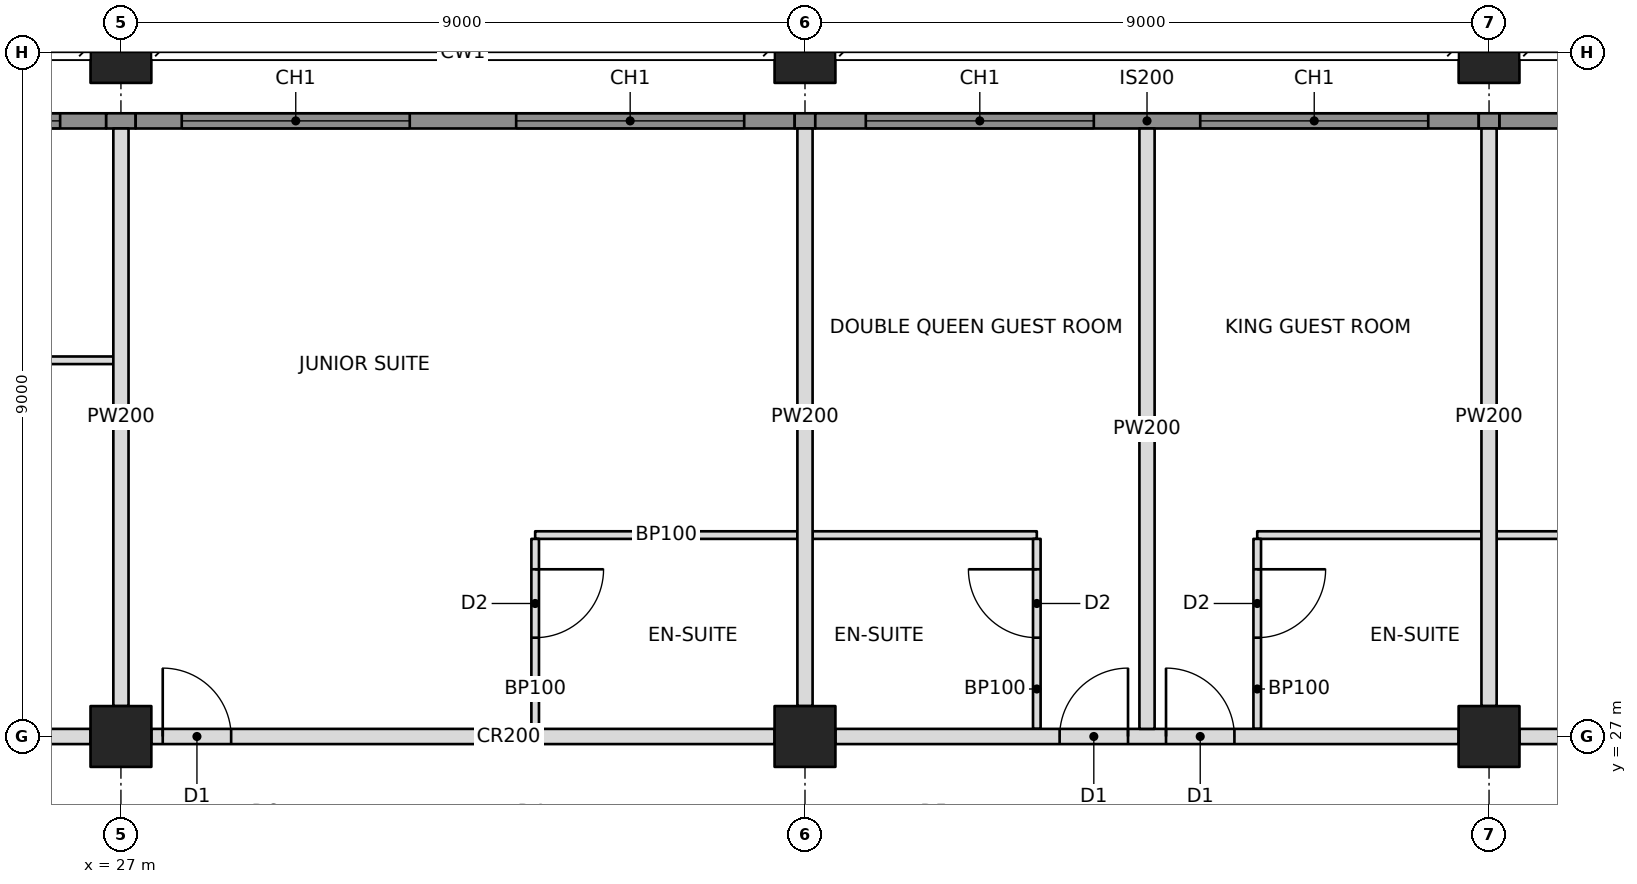
"""IFC4 building model, lengths in metres.
Left out: names, types, materials, properties, quantities, classifications, styles, units other than length and angle.
Written with IfcOpenShell. Run it as: python <this file> out.ifc"""

import sys

from ifc_helpers import new_model, si_unit, direction, frame, frame_2d, origin, origin_2d, place, context, subcontext, project, spatial, rectangle, hollow_rectangle, extrude, element, fill, save


model = new_model("IFC4")
c1 = context("Model", 3, precision=1e-05, world=origin(), true_north=direction((0.0, 1.0)))
c2 = subcontext(c1, "Body", "Model", "MODEL_VIEW")
j1 = project(units=[si_unit("LENGTHUNIT", "METRE"), si_unit("PLANEANGLEUNIT", "RADIAN")], contexts=[c1])
p1 = place(None, origin())
s1 = spatial("IfcSite", under=j1, at=p1, CompositionType="ELEMENT")
p2 = place(p1, origin())
s2 = spatial("IfcBuilding", under=s1, at=p2, CompositionType="ELEMENT")
p3 = place(p2, frame((0.0, 0.0, 82.4)))
s3 = spatial("IfcBuildingStorey", under=s2, at=p3, CompositionType="ELEMENT", Elevation=82.4)
p4 = place(p3, frame((27.0, 27.0, 0.0), z_axis=(0.0, 0.0, 1.0), x_axis=(1.0, 0.0, 0.0)))
e1 = element("IfcColumn", 1, at=p4, inside=s3, PredefinedType="COLUMN", context=c2, shape_type="SweptSolid", body=[
    extrude(hollow_rectangle(XDim=0.8, YDim=0.8, WallThickness=0.09, at=origin_2d()), origin(), (0.0, 0.0, 1.0), 3.4),
])
p5 = place(p3, frame((27.0, 36.0, 0.0), z_axis=(0.0, 0.0, 1.0), x_axis=(1.0, 0.0, 0.0)))
e2 = element("IfcColumn", 2, at=p5, inside=s3, PredefinedType="COLUMN", context=c2, shape_type="SweptSolid", body=[
    extrude(hollow_rectangle(XDim=0.8, YDim=0.8, WallThickness=0.07, at=origin_2d()), origin(), (0.0, 0.0, 1.0), 3.4),
])
p6 = place(p3, frame((36.0, 27.0, 0.0), z_axis=(0.0, 0.0, 1.0), x_axis=(1.0, 0.0, 0.0)))
e3 = element("IfcColumn", 3, at=p6, inside=s3, PredefinedType="COLUMN", context=c2, shape_type="SweptSolid", body=[
    extrude(hollow_rectangle(XDim=0.8, YDim=0.8, WallThickness=0.09, at=origin_2d()), origin(), (0.0, 0.0, 1.0), 3.4),
])
p7 = place(p3, frame((36.0, 36.0, 0.0), z_axis=(0.0, 0.0, 1.0), x_axis=(1.0, 0.0, 0.0)))
e4 = element("IfcColumn", 4, at=p7, inside=s3, PredefinedType="COLUMN", context=c2, shape_type="SweptSolid", body=[
    extrude(hollow_rectangle(XDim=0.8, YDim=0.8, WallThickness=0.07, at=origin_2d()), origin(), (0.0, 0.0, 1.0), 3.4),
])
p8 = place(p3, frame((45.0, 27.0, 0.0), z_axis=(0.0, 0.0, 1.0), x_axis=(0.0, 1.0, 0.0)))
e5 = element("IfcColumn", 5, at=p8, inside=s3, PredefinedType="COLUMN", context=c2, shape_type="SweptSolid", body=[
    extrude(hollow_rectangle(XDim=0.8, YDim=0.8, WallThickness=0.09, at=origin_2d()), origin(), (0.0, 0.0, 1.0), 3.4),
])
p9 = place(p3, frame((45.0, 36.0, 0.0), z_axis=(0.0, 0.0, 1.0), x_axis=(1.0, 0.0, 0.0)))
e6 = element("IfcColumn", 6, at=p9, inside=s3, PredefinedType="COLUMN", context=c2, shape_type="SweptSolid", body=[
    extrude(hollow_rectangle(XDim=0.8, YDim=0.8, WallThickness=0.07, at=origin_2d()), origin(), (0.0, 0.0, 1.0), 3.4),
])
p10 = place(p3, frame((18.4, 27.0, 0.0), z_axis=(0.0, 0.0, 1.0), x_axis=(1.0, 0.0, 0.0)))
e7 = element("IfcWall", 7, at=p10, inside=s3, PredefinedType="PARTITIONING", context=c2, shape_type="SweptSolid", body=[
    extrude(rectangle(XDim=8.2, YDim=0.2, at=frame_2d((4.1, 0.0))), origin(), (0.0, 0.0, 1.0), 2.405),
])
p11 = place(p10, frame((0.15, 0.0, 0.0)))
e8 = element("IfcOpeningElement", 8, at=p11, cuts=e7, PredefinedType="OPENING", context=c2, shape_type="SweptSolid", body=[
    extrude(rectangle(XDim=0.9, YDim=2.1, at=frame_2d((0.45, 1.05))), frame((0.0, 0.11, 0.0), z_axis=(0.0, -1.0, 0.0), x_axis=(1.0, 0.0, 0.0)), (0.0, 0.0, 1.0), 0.22),
])
p12 = place(p3, frame((27.4, 27.0, 0.0), z_axis=(0.0, 0.0, 1.0), x_axis=(1.0, 0.0, 0.0)))
e9 = element("IfcWall", 9, at=p12, inside=s3, PredefinedType="PARTITIONING", context=c2, shape_type="SweptSolid", body=[
    extrude(rectangle(XDim=8.2, YDim=0.2, at=frame_2d((4.1, 0.0))), origin(), (0.0, 0.0, 1.0), 2.405),
])
p13 = place(p12, frame((0.15, 0.0, 0.0)))
e10 = element("IfcOpeningElement", 10, at=p13, cuts=e9, PredefinedType="OPENING", context=c2, shape_type="SweptSolid", body=[
    extrude(rectangle(XDim=0.9, YDim=2.1, at=frame_2d((0.45, 1.05))), frame((0.0, 0.11, 0.0), z_axis=(0.0, -1.0, 0.0), x_axis=(1.0, 0.0, 0.0)), (0.0, 0.0, 1.0), 0.22),
])
p14 = place(p3, frame((36.4, 27.0, 0.0), z_axis=(0.0, 0.0, 1.0), x_axis=(1.0, 0.0, 0.0)))
e11 = element("IfcWall", 11, at=p14, inside=s3, PredefinedType="PARTITIONING", context=c2, shape_type="SweptSolid", body=[
    extrude(rectangle(XDim=8.2, YDim=0.2, at=frame_2d((4.1, 0.0))), origin(), (0.0, 0.0, 1.0), 2.438),
])
p15 = place(p14, frame((2.95, 0.0, 0.0)))
e12 = element("IfcOpeningElement", 12, at=p15, cuts=e11, PredefinedType="OPENING", context=c2, shape_type="SweptSolid", body=[
    extrude(rectangle(XDim=0.9, YDim=2.1, at=frame_2d((0.45, 1.05))), frame((0.0, 0.11, 0.0), z_axis=(0.0, -1.0, 0.0), x_axis=(1.0, 0.0, 0.0)), (0.0, 0.0, 1.0), 0.22),
])
p16 = place(p14, frame((4.35, 0.0, 0.0)))
e13 = element("IfcOpeningElement", 13, at=p16, cuts=e11, PredefinedType="OPENING", context=c2, shape_type="SweptSolid", body=[
    extrude(rectangle(XDim=0.9, YDim=2.1, at=frame_2d((0.45, 1.05))), frame((0.0, 0.11, 0.0), z_axis=(0.0, -1.0, 0.0), x_axis=(1.0, 0.0, 0.0)), (0.0, 0.0, 1.0), 0.22),
])
p17 = place(p3, frame((45.4, 27.0, 0.0), z_axis=(0.0, 0.0, 1.0), x_axis=(1.0, 0.0, 0.0)))
e14 = element("IfcWall", 14, at=p17, inside=s3, PredefinedType="PARTITIONING", context=c2, shape_type="SweptSolid", body=[
    extrude(rectangle(XDim=7.6, YDim=0.2, at=frame_2d((3.8, 0.0))), origin(), (0.0, 0.0, 1.0), 2.438),
])
p18 = place(p17, frame((6.45, 0.0, 0.0)))
e15 = element("IfcOpeningElement", 15, at=p18, cuts=e14, PredefinedType="OPENING", context=c2, shape_type="SweptSolid", body=[
    extrude(rectangle(XDim=0.9, YDim=2.1, at=frame_2d((0.45, 1.05))), frame((0.0, 0.11, 0.0), z_axis=(0.0, -1.0, 0.0), x_axis=(1.0, 0.0, 0.0)), (0.0, 0.0, 1.0), 0.22),
])
p19 = place(p3, frame((27.0, 27.4, 0.0), z_axis=(0.0, 0.0, 1.0), x_axis=(0.0, 1.0, 0.0)))
e16 = element("IfcWall", 16, at=p19, inside=s3, PredefinedType="PARTITIONING", context=c2, shape_type="SweptSolid", body=[
    extrude(rectangle(XDim=7.6, YDim=0.2, at=frame_2d((3.8, 0.0))), origin(), (0.0, 0.0, 1.0), 2.405),
])
p20 = place(p3, frame((36.0, 27.4, 0.0), z_axis=(0.0, 0.0, 1.0), x_axis=(0.0, 1.0, 0.0)))
e17 = element("IfcWall", 17, at=p20, inside=s3, PredefinedType="PARTITIONING", context=c2, shape_type="SweptSolid", body=[
    extrude(rectangle(XDim=7.6, YDim=0.2, at=frame_2d((3.8, 0.0))), origin(), (0.0, 0.0, 1.0), 2.438),
])
p21 = place(p3, frame((40.5, 27.1, 0.0), z_axis=(0.0, 0.0, 1.0), x_axis=(0.0, 1.0, 0.0)))
e18 = element("IfcWall", 18, at=p21, inside=s3, PredefinedType="PARTITIONING", context=c2, shape_type="SweptSolid", body=[
    extrude(rectangle(XDim=7.9, YDim=0.2, at=frame_2d((3.95, 0.0))), origin(), (0.0, 0.0, 1.0), 2.438),
])
p22 = place(p3, frame((45.0, 27.4, 0.0), z_axis=(0.0, 0.0, 1.0), x_axis=(0.0, 1.0, 0.0)))
e19 = element("IfcWall", 19, at=p22, inside=s3, PredefinedType="PARTITIONING", context=c2, shape_type="SweptSolid", body=[
    extrude(rectangle(XDim=7.6, YDim=0.2, at=frame_2d((3.8, 0.0))), origin(), (0.0, 0.0, 1.0), 2.438),
])
p23 = place(p3, frame((22.5, 31.95, 0.0), z_axis=(0.0, 0.0, 1.0), x_axis=(1.0, 0.0, 0.0)))
e20 = element("IfcWall", 20, at=p23, inside=s3, PredefinedType="PARTITIONING", context=c2, shape_type="SweptSolid", body=[
    extrude(rectangle(XDim=4.4, YDim=0.1, at=frame_2d((2.2, 0.0))), origin(), (0.0, 0.0, 1.0), 2.404),
])
p24 = place(p23, frame((0.5, 0.0, 0.0)))
e21 = element("IfcOpeningElement", 21, at=p24, cuts=e20, PredefinedType="OPENING", context=c2, shape_type="SweptSolid", body=[
    extrude(rectangle(XDim=0.9, YDim=2.1, at=frame_2d((0.45, 1.05))), frame((0.0, 0.06, 0.0), z_axis=(0.0, -1.0, 0.0), x_axis=(1.0, 0.0, 0.0)), (0.0, 0.0, 1.0), 0.12),
])
p25 = place(p3, frame((32.45, 29.65, 0.0), z_axis=(0.0, 0.0, 1.0), x_axis=(1.0, 0.0, 0.0)))
e22 = element("IfcWall", 22, at=p25, inside=s3, PredefinedType="PARTITIONING", context=c2, shape_type="SweptSolid", body=[
    extrude(rectangle(XDim=3.45, YDim=0.1, at=frame_2d((1.725, 0.0))), origin(), (0.0, 0.0, 1.0), 2.438),
])
p26 = place(p3, frame((32.45, 27.1, 0.0), z_axis=(0.0, 0.0, 1.0), x_axis=(0.0, 1.0, 0.0)))
e23 = element("IfcWall", 23, at=p26, inside=s3, PredefinedType="PARTITIONING", context=c2, shape_type="SweptSolid", body=[
    extrude(rectangle(XDim=2.5, YDim=0.1, at=frame_2d((1.25, 0.0))), origin(), (0.0, 0.0, 1.0), 2.404),
])
p27 = place(p26, frame((1.2, 0.0, 0.0)))
e24 = element("IfcOpeningElement", 24, at=p27, cuts=e23, PredefinedType="OPENING", context=c2, shape_type="SweptSolid", body=[
    extrude(rectangle(XDim=0.9, YDim=2.1, at=frame_2d((0.45, 1.05))), frame((0.0, 0.06, 0.0), z_axis=(0.0, -1.0, 0.0), x_axis=(1.0, 0.0, 0.0)), (0.0, 0.0, 1.0), 0.12),
])
p28 = place(p3, frame((36.1, 29.65, 0.0), z_axis=(0.0, 0.0, 1.0), x_axis=(1.0, 0.0, 0.0)))
e25 = element("IfcWall", 25, at=p28, inside=s3, PredefinedType="PARTITIONING", context=c2, shape_type="SweptSolid", body=[
    extrude(rectangle(XDim=2.95, YDim=0.1, at=frame_2d((1.475, 0.0))), origin(), (0.0, 0.0, 1.0), 2.438),
])
p29 = place(p3, frame((39.05, 27.1, 0.0), z_axis=(0.0, 0.0, 1.0), x_axis=(0.0, 1.0, 0.0)))
e26 = element("IfcWall", 26, at=p29, inside=s3, PredefinedType="PARTITIONING", context=c2, shape_type="SweptSolid", body=[
    extrude(rectangle(XDim=2.5, YDim=0.1, at=frame_2d((1.25, 0.0))), origin(), (0.0, 0.0, 1.0), 2.438),
])
p30 = place(p29, frame((1.2, 0.0, 0.0)))
e27 = element("IfcOpeningElement", 27, at=p30, cuts=e26, PredefinedType="OPENING", context=c2, shape_type="SweptSolid", body=[
    extrude(rectangle(XDim=0.9, YDim=2.1, at=frame_2d((0.45, 1.05))), frame((0.0, 0.06, 0.0), z_axis=(0.0, -1.0, 0.0), x_axis=(1.0, 0.0, 0.0)), (0.0, 0.0, 1.0), 0.12),
])
p31 = place(p3, frame((41.95, 29.65, 0.0), z_axis=(0.0, 0.0, 1.0), x_axis=(1.0, 0.0, 0.0)))
e28 = element("IfcWall", 28, at=p31, inside=s3, PredefinedType="PARTITIONING", context=c2, shape_type="SweptSolid", body=[
    extrude(rectangle(XDim=2.95, YDim=0.1, at=frame_2d((1.475, 0.0))), origin(), (0.0, 0.0, 1.0), 2.438),
])
p32 = place(p3, frame((41.95, 27.1, 0.0), z_axis=(0.0, 0.0, 1.0), x_axis=(0.0, 1.0, 0.0)))
e29 = element("IfcWall", 29, at=p32, inside=s3, PredefinedType="PARTITIONING", context=c2, shape_type="SweptSolid", body=[
    extrude(rectangle(XDim=2.5, YDim=0.1, at=frame_2d((1.25, 0.0))), origin(), (0.0, 0.0, 1.0), 2.438),
])
p33 = place(p32, frame((1.2, 0.0, 0.0)))
e30 = element("IfcOpeningElement", 30, at=p33, cuts=e29, PredefinedType="OPENING", context=c2, shape_type="SweptSolid", body=[
    extrude(rectangle(XDim=0.9, YDim=2.1, at=frame_2d((0.45, 1.05))), frame((0.0, 0.06, 0.0), z_axis=(0.0, -1.0, 0.0), x_axis=(1.0, 0.0, 0.0)), (0.0, 0.0, 1.0), 0.12),
])
p34 = place(p3, frame((45.1, 29.65, 0.0), z_axis=(0.0, 0.0, 1.0), x_axis=(1.0, 0.0, 0.0)))
e31 = element("IfcWall", 31, at=p34, inside=s3, PredefinedType="PARTITIONING", context=c2, shape_type="SweptSolid", body=[
    extrude(rectangle(XDim=3.45, YDim=0.1, at=frame_2d((1.725, 0.0))), origin(), (0.0, 0.0, 1.0), 2.438),
])
p35 = place(p3, frame((18.194, 35.1, 0.0), z_axis=(0.0, 0.0, 1.0), x_axis=(1.0, 0.0, 0.0)))
e32 = element("IfcWall", 32, at=p35, inside=s3, PredefinedType="SOLIDWALL", context=c2, shape_type="SweptSolid", body=[
    extrude(rectangle(XDim=8.612, YDim=0.2, at=frame_2d((4.306, 0.0))), origin(), (0.0, 0.0, 1.0), 3.2),
])
p36 = place(p35, frame((0.606, 0.0, 0.6)))
e33 = element("IfcOpeningElement", 33, at=p36, cuts=e32, PredefinedType="OPENING", context=c2, shape_type="SweptSolid", body=[
    extrude(rectangle(XDim=3.0, YDim=2.2, at=frame_2d((1.5, 1.1))), frame((0.0, 0.11, 0.0), z_axis=(0.0, -1.0, 0.0), x_axis=(1.0, 0.0, 0.0)), (0.0, 0.0, 1.0), 0.22),
])
p37 = place(p35, frame((5.006, 0.0, 0.6)))
e34 = element("IfcOpeningElement", 34, at=p37, cuts=e32, PredefinedType="OPENING", context=c2, shape_type="SweptSolid", body=[
    extrude(rectangle(XDim=3.0, YDim=2.2, at=frame_2d((1.5, 1.1))), frame((0.0, 0.11, 0.0), z_axis=(0.0, -1.0, 0.0), x_axis=(1.0, 0.0, 0.0)), (0.0, 0.0, 1.0), 0.22),
])
p38 = place(p3, frame((26.806, 35.1, 0.0), z_axis=(0.0, 0.0, 1.0), x_axis=(1.0, 0.0, 0.0)))
e35 = element("IfcWall", 35, at=p38, inside=s3, PredefinedType="SOLIDWALL", context=c2, shape_type="SweptSolid", body=[
    extrude(rectangle(XDim=0.388, YDim=0.2, at=frame_2d((0.194, 0.0))), origin(), (0.0, 0.0, 1.0), 2.404),
])
p39 = place(p3, frame((27.194, 35.1, 0.0), z_axis=(0.0, 0.0, 1.0), x_axis=(1.0, 0.0, 0.0)))
e36 = element("IfcWall", 36, at=p39, inside=s3, PredefinedType="SOLIDWALL", context=c2, shape_type="SweptSolid", body=[
    extrude(rectangle(XDim=8.671, YDim=0.2, at=frame_2d((4.335, 0.0))), origin(), (0.0, 0.0, 1.0), 3.2),
])
p40 = place(p39, frame((0.606, 0.0, 0.6)))
e37 = element("IfcOpeningElement", 37, at=p40, cuts=e36, PredefinedType="OPENING", context=c2, shape_type="SweptSolid", body=[
    extrude(rectangle(XDim=3.0, YDim=2.2, at=frame_2d((1.5, 1.1))), frame((0.0, 0.11, 0.0), z_axis=(0.0, -1.0, 0.0), x_axis=(1.0, 0.0, 0.0)), (0.0, 0.0, 1.0), 0.22),
])
p41 = place(p39, frame((5.006, 0.0, 0.6)))
e38 = element("IfcOpeningElement", 38, at=p41, cuts=e36, PredefinedType="OPENING", context=c2, shape_type="SweptSolid", body=[
    extrude(rectangle(XDim=3.0, YDim=2.2, at=frame_2d((1.5, 1.1))), frame((0.0, 0.11, 0.0), z_axis=(0.0, -1.0, 0.0), x_axis=(1.0, 0.0, 0.0)), (0.0, 0.0, 1.0), 0.22),
])
p42 = place(p3, frame((35.865, 35.1, 0.0), z_axis=(0.0, 0.0, 1.0), x_axis=(1.0, 0.0, 0.0)))
e39 = element("IfcWall", 39, at=p42, inside=s3, PredefinedType="SOLIDWALL", context=c2, shape_type="SweptSolid", body=[
    extrude(rectangle(XDim=0.271, YDim=0.2, at=frame_2d((0.135, 0.0))), origin(), (0.0, 0.0, 1.0), 2.438),
])
p43 = place(p3, frame((36.135, 35.1, 0.0), z_axis=(0.0, 0.0, 1.0), x_axis=(1.0, 0.0, 0.0)))
e40 = element("IfcWall", 40, at=p43, inside=s3, PredefinedType="SOLIDWALL", context=c2, shape_type="SweptSolid", body=[
    extrude(rectangle(XDim=8.729, YDim=0.2, at=frame_2d((4.365, 0.0))), origin(), (0.0, 0.0, 1.0), 3.2),
])
p44 = place(p43, frame((0.665, 0.0, 0.6)))
e41 = element("IfcOpeningElement", 41, at=p44, cuts=e40, PredefinedType="OPENING", context=c2, shape_type="SweptSolid", body=[
    extrude(rectangle(XDim=3.0, YDim=2.2, at=frame_2d((1.5, 1.1))), frame((0.0, 0.11, 0.0), z_axis=(0.0, -1.0, 0.0), x_axis=(1.0, 0.0, 0.0)), (0.0, 0.0, 1.0), 0.22),
])
p45 = place(p43, frame((5.065, 0.0, 0.6)))
e42 = element("IfcOpeningElement", 42, at=p45, cuts=e40, PredefinedType="OPENING", context=c2, shape_type="SweptSolid", body=[
    extrude(rectangle(XDim=3.0, YDim=2.2, at=frame_2d((1.5, 1.1))), frame((0.0, 0.11, 0.0), z_axis=(0.0, -1.0, 0.0), x_axis=(1.0, 0.0, 0.0)), (0.0, 0.0, 1.0), 0.22),
])
p46 = place(p3, frame((44.865, 35.1, 0.0), z_axis=(0.0, 0.0, 1.0), x_axis=(1.0, 0.0, 0.0)))
e43 = element("IfcWall", 43, at=p46, inside=s3, PredefinedType="SOLIDWALL", context=c2, shape_type="SweptSolid", body=[
    extrude(rectangle(XDim=0.271, YDim=0.2, at=frame_2d((0.135, 0.0))), origin(), (0.0, 0.0, 1.0), 2.438),
])
p47 = place(p3, frame((45.135, 35.1, 0.0), z_axis=(0.0, 0.0, 1.0), x_axis=(1.0, 0.0, 0.0)))
e44 = element("IfcWall", 44, at=p47, inside=s3, PredefinedType="SOLIDWALL", context=c2, shape_type="SweptSolid", body=[
    extrude(rectangle(XDim=5.865, YDim=0.2, at=frame_2d((2.932, 0.0))), origin(), (0.0, 0.0, 1.0), 3.2),
])
p48 = place(p47, frame((1.415, 0.0, 0.6)))
e45 = element("IfcOpeningElement", 45, at=p48, cuts=e44, PredefinedType="OPENING", context=c2, shape_type="SweptSolid", body=[
    extrude(rectangle(XDim=3.0, YDim=2.2, at=frame_2d((1.5, 1.1))), frame((0.0, 0.11, 0.0), z_axis=(0.0, -1.0, 0.0), x_axis=(1.0, 0.0, 0.0)), (0.0, 0.0, 1.0), 0.22),
])
p49 = place(p37, origin())
e46 = element("IfcWindow", 46, at=p49, inside=s3, PartitioningType="TRIPLE_PANEL_VERTICAL", PredefinedType="WINDOW", context=c2, shape_type="SweptSolid", body=[
    extrude(rectangle(XDim=3.0, YDim=2.2, at=frame_2d((1.5, 1.1))), frame((0.0, 0.03, 0.0), z_axis=(0.0, -1.0, 0.0), x_axis=(1.0, 0.0, 0.0)), (0.0, 0.0, 1.0), 0.06),
])
fill(e34, e46)
p50 = place(p40, origin())
e47 = element("IfcWindow", 47, at=p50, inside=s3, PartitioningType="TRIPLE_PANEL_VERTICAL", PredefinedType="WINDOW", context=c2, shape_type="SweptSolid", body=[
    extrude(rectangle(XDim=3.0, YDim=2.2, at=frame_2d((1.5, 1.1))), frame((0.0, 0.03, 0.0), z_axis=(0.0, -1.0, 0.0), x_axis=(1.0, 0.0, 0.0)), (0.0, 0.0, 1.0), 0.06),
])
fill(e37, e47)
p51 = place(p41, origin())
e48 = element("IfcWindow", 48, at=p51, inside=s3, PartitioningType="TRIPLE_PANEL_VERTICAL", PredefinedType="WINDOW", context=c2, shape_type="SweptSolid", body=[
    extrude(rectangle(XDim=3.0, YDim=2.2, at=frame_2d((1.5, 1.1))), frame((0.0, 0.03, 0.0), z_axis=(0.0, -1.0, 0.0), x_axis=(1.0, 0.0, 0.0)), (0.0, 0.0, 1.0), 0.06),
])
fill(e38, e48)
p52 = place(p44, origin())
e49 = element("IfcWindow", 49, at=p52, inside=s3, PartitioningType="TRIPLE_PANEL_VERTICAL", PredefinedType="WINDOW", context=c2, shape_type="SweptSolid", body=[
    extrude(rectangle(XDim=3.0, YDim=2.2, at=frame_2d((1.5, 1.1))), frame((0.0, 0.03, 0.0), z_axis=(0.0, -1.0, 0.0), x_axis=(1.0, 0.0, 0.0)), (0.0, 0.0, 1.0), 0.06),
])
fill(e41, e49)
p53 = place(p45, origin())
e50 = element("IfcWindow", 50, at=p53, inside=s3, PartitioningType="TRIPLE_PANEL_VERTICAL", PredefinedType="WINDOW", context=c2, shape_type="SweptSolid", body=[
    extrude(rectangle(XDim=3.0, YDim=2.2, at=frame_2d((1.5, 1.1))), frame((0.0, 0.03, 0.0), z_axis=(0.0, -1.0, 0.0), x_axis=(1.0, 0.0, 0.0)), (0.0, 0.0, 1.0), 0.06),
])
fill(e42, e50)
p54 = place(p27, frame((0.9, 0.0, 0.0), z_axis=(0.0, 0.0, 1.0), x_axis=(-1.0, 0.0, 0.0)))
e51 = element("IfcDoor", 51, at=p54, inside=s3, OperationType="SINGLE_SWING_LEFT", PredefinedType="DOOR", context=c2, shape_type="SweptSolid", body=[
    extrude(rectangle(XDim=0.9, YDim=2.1, at=frame_2d((0.45, 1.05))), frame((0.0, 0.025, 0.0), z_axis=(0.0, -1.0, 0.0), x_axis=(1.0, 0.0, 0.0)), (0.0, 0.0, 1.0), 0.05),
])
fill(e24, e51)
p55 = place(p13, origin())
e52 = element("IfcDoor", 52, at=p55, inside=s3, OperationType="SINGLE_SWING_LEFT", PredefinedType="DOOR", context=c2, shape_type="SweptSolid", body=[
    extrude(rectangle(XDim=0.9, YDim=2.1, at=frame_2d((0.45, 1.05))), frame((0.0, 0.025, 0.0), z_axis=(0.0, -1.0, 0.0), x_axis=(1.0, 0.0, 0.0)), (0.0, 0.0, 1.0), 0.05),
])
fill(e10, e52)
p56 = place(p30, origin())
e53 = element("IfcDoor", 53, at=p56, inside=s3, OperationType="SINGLE_SWING_RIGHT", PredefinedType="DOOR", context=c2, shape_type="SweptSolid", body=[
    extrude(rectangle(XDim=0.9, YDim=2.1, at=frame_2d((0.45, 1.05))), frame((0.0, 0.025, 0.0), z_axis=(0.0, -1.0, 0.0), x_axis=(1.0, 0.0, 0.0)), (0.0, 0.0, 1.0), 0.05),
])
fill(e27, e53)
p57 = place(p15, origin())
e54 = element("IfcDoor", 54, at=p57, inside=s3, OperationType="SINGLE_SWING_RIGHT", PredefinedType="DOOR", context=c2, shape_type="SweptSolid", body=[
    extrude(rectangle(XDim=0.9, YDim=2.1, at=frame_2d((0.45, 1.05))), frame((0.0, 0.025, 0.0), z_axis=(0.0, -1.0, 0.0), x_axis=(1.0, 0.0, 0.0)), (0.0, 0.0, 1.0), 0.05),
])
fill(e12, e54)
p58 = place(p33, frame((0.9, 0.0, 0.0), z_axis=(0.0, 0.0, 1.0), x_axis=(-1.0, 0.0, 0.0)))
e55 = element("IfcDoor", 55, at=p58, inside=s3, OperationType="SINGLE_SWING_LEFT", PredefinedType="DOOR", context=c2, shape_type="SweptSolid", body=[
    extrude(rectangle(XDim=0.9, YDim=2.1, at=frame_2d((0.45, 1.05))), frame((0.0, 0.025, 0.0), z_axis=(0.0, -1.0, 0.0), x_axis=(1.0, 0.0, 0.0)), (0.0, 0.0, 1.0), 0.05),
])
fill(e30, e55)
p59 = place(p16, origin())
e56 = element("IfcDoor", 56, at=p59, inside=s3, OperationType="SINGLE_SWING_LEFT", PredefinedType="DOOR", context=c2, shape_type="SweptSolid", body=[
    extrude(rectangle(XDim=0.9, YDim=2.1, at=frame_2d((0.45, 1.05))), frame((0.0, 0.025, 0.0), z_axis=(0.0, -1.0, 0.0), x_axis=(1.0, 0.0, 0.0)), (0.0, 0.0, 1.0), 0.05),
])
fill(e13, e56)
save(model, sys.argv[1])
